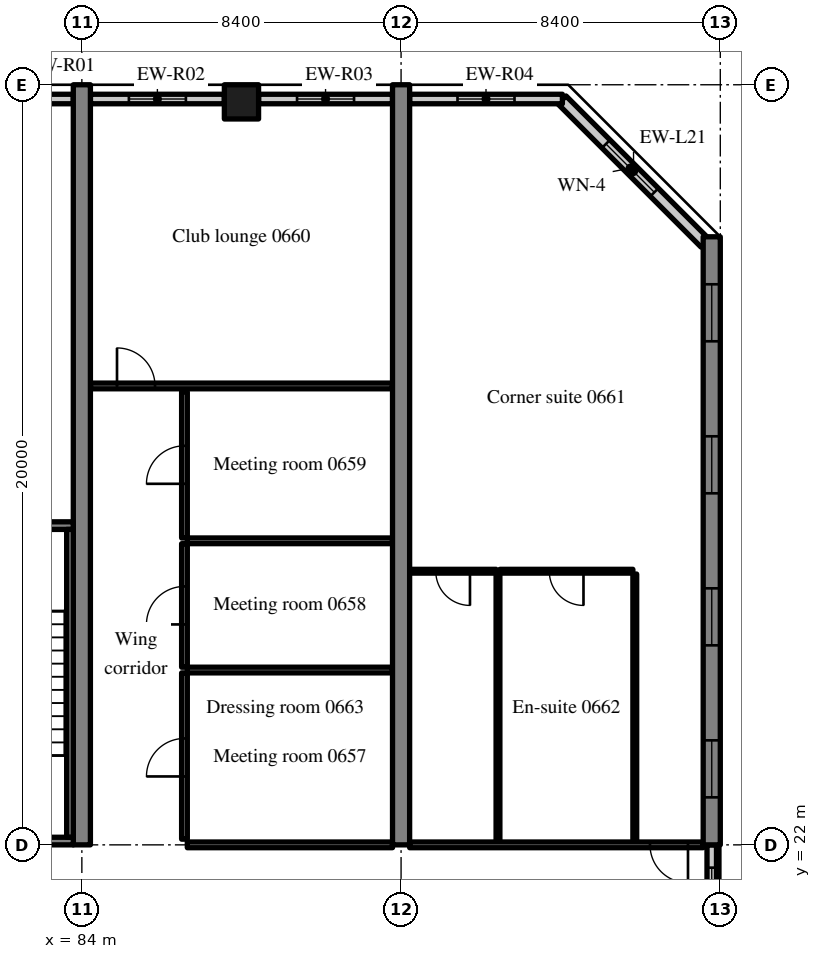
"""IFC4 building model, lengths in metres.
Left out: names, types, materials, properties, quantities, classifications, styles, units other than length and angle.
Written with IfcOpenShell. Run it as: python <this file> out.ifc"""

import sys

from ifc_helpers import new_model, si_unit, direction, frame, frame_2d, origin, origin_2d, place, context, subcontext, project, spatial, rectangle, extrude, source, transform, mapped, element, fill, save


model = new_model("IFC4")
c1 = context("Model", 3, precision=1e-05, world=origin(), true_north=direction((0.0, 1.0)))
c2 = subcontext(c1, "Body", "Model", "MODEL_VIEW")
j1 = project(units=[si_unit("LENGTHUNIT", "METRE"), si_unit("PLANEANGLEUNIT", "RADIAN")], contexts=[c1])
p1 = place(None, origin())
s1 = spatial("IfcSite", under=j1, at=p1, CompositionType="ELEMENT")
p2 = place(p1, origin())
s2 = spatial("IfcBuilding", under=s1, at=p2, CompositionType="ELEMENT")
p3 = place(p2, frame((0.0, 0.0, 31.6)))
s3 = spatial("IfcBuildingStorey", under=s2, at=p3, CompositionType="ELEMENT", Elevation=31.6)
m1 = source(origin(), c2, "Body", "SweptSolid", [
    extrude(rectangle(XDim=20.0, YDim=0.45, at=frame_2d((10.0, 0.0))), origin(), (0.0, 0.0, 1.0), 3.52),
])
for number, where, z_axis, x_axis in (
    (1, (84.0, 22.0, 0.0), (0.0, 0.0, 1.0), (0.0, 1.0, 0.0)),
    (2, (92.4, 22.0, 0.0), (0.0, 0.0, 1.0), (0.0, 1.0, 0.0)),
):
    element("IfcWall", number, at=place(p3, frame(where, z_axis=z_axis, x_axis=x_axis)), inside=s3, PredefinedType="SHEAR", context=c2, shape_type="MappedRepresentation", body=[
        mapped(m1, transform((0.0, 0.0, 0.0), scale=1.0)),
    ])
m2 = source(origin(), c2, "Body", "SweptSolid", [
    extrude(rectangle(XDim=16.0, YDim=0.45, at=frame_2d((8.0, 0.0))), origin(), (0.0, 0.0, 1.0), 3.52),
])
p4 = place(p3, frame((100.575, 22.0, 0.0), z_axis=(0.0, 0.0, 1.0), x_axis=(0.0, 1.0, 0.0)))
e3 = element("IfcWall", 3, at=p4, inside=s3, PredefinedType="SHEAR", context=c2, shape_type="MappedRepresentation", body=[
    mapped(m2, transform((0.0, 0.0, 0.0), scale=1.0)),
])
m3 = source(origin(), c2, "Body", "SweptSolid", [
    extrude(rectangle(XDim=1.5, YDim=1.5, at=frame_2d((0.75, 0.75))), frame((0.0, 0.235, 0.0), z_axis=(0.0, -1.0, 0.0), x_axis=(1.0, 0.0, 0.0)), (0.0, 0.0, 1.0), 0.47),
])
p5 = place(p4, frame((1.25, 0.0, 0.9)))
e4 = element("IfcOpeningElement", 4, at=p5, cuts=e3, PredefinedType="OPENING", context=c2, shape_type="MappedRepresentation", body=[
    mapped(m3, transform((0.0, 0.0, 0.0), scale=1.0)),
])
p6 = place(p4, frame((5.25, 0.0, 0.9)))
e5 = element("IfcOpeningElement", 5, at=p6, cuts=e3, PredefinedType="OPENING", context=c2, shape_type="MappedRepresentation", body=[
    mapped(m3, transform((0.0, 0.0, 0.0), scale=1.0)),
])
p7 = place(p4, frame((9.25, 0.0, 0.9)))
e6 = element("IfcOpeningElement", 6, at=p7, cuts=e3, PredefinedType="OPENING", context=c2, shape_type="MappedRepresentation", body=[
    mapped(m3, transform((0.0, 0.0, 0.0), scale=1.0)),
])
p8 = place(p4, frame((13.25, 0.0, 0.9)))
e7 = element("IfcOpeningElement", 7, at=p8, cuts=e3, PredefinedType="OPENING", context=c2, shape_type="MappedRepresentation", body=[
    mapped(m3, transform((0.0, 0.0, 0.0), scale=1.0)),
])
m4 = source(origin(), c2, "Body", "SweptSolid", [
    extrude(rectangle(XDim=0.9, YDim=0.9, at=origin_2d()), origin(), (0.0, 0.0, 1.0), 3.52),
])
p9 = place(p3, frame((88.2, 41.55, 0.0), z_axis=(0.0, 0.0, 1.0), x_axis=(1.0, 0.0, 0.0)))
e8 = element("IfcColumn", 8, at=p9, inside=s3, PredefinedType="COLUMN", context=c2, shape_type="MappedRepresentation", body=[
    mapped(m4, transform((0.0, 0.0, 0.0), scale=1.0)),
])
m5 = source(origin(), c2, "Body", "SweptSolid", [
    extrude(rectangle(XDim=5.326, YDim=0.3, at=frame_2d((2.663, 0.0))), origin(), (0.0, 0.0, 1.0), 3.52),
])
p10 = place(p3, frame((100.4, 37.834, 0.0), z_axis=(0.0, 0.0, 1.0), x_axis=(-0.707083859269, 0.707129702361, 0.0)))
e9 = element("IfcWall", 9, at=p10, inside=s3, PredefinedType="SOLIDWALL", context=c2, shape_type="MappedRepresentation", body=[
    mapped(m5, transform((0.0, 0.0, 0.0), scale=1.0)),
])
m6 = source(origin(), c2, "Body", "SweptSolid", [
    extrude(rectangle(XDim=1.8, YDim=1.5, at=frame_2d((0.9, 0.75))), frame((0.0, 0.16, 0.0), z_axis=(0.0, -1.0, 0.0), x_axis=(1.0, 0.0, 0.0)), (0.0, 0.0, 1.0), 0.32),
])
p11 = place(p10, frame((1.889, 0.0, 0.9)))
e10 = element("IfcOpeningElement", 10, at=p11, cuts=e9, PredefinedType="OPENING", context=c2, shape_type="MappedRepresentation", body=[
    mapped(m6, transform((0.0, 0.0, 0.0), scale=1.0)),
])
m7 = source(origin(), c2, "Body", "SweptSolid", [
    extrude(rectangle(XDim=1.633, YDim=0.25, at=frame_2d((0.816, 0.0))), origin(), (0.0, 0.0, 1.0), 2.77),
])
p12 = place(p3, frame((83.775, 41.625, 0.0), z_axis=(0.0, 0.0, 1.0), x_axis=(-1.0, 0.0, 0.0)))
e11 = element("IfcWall", 11, at=p12, inside=s3, PredefinedType="SOLIDWALL", context=c2, shape_type="MappedRepresentation", body=[
    mapped(m7, transform((0.0, 0.0, 0.0), scale=1.0)),
])
m8 = source(origin(), c2, "Body", "SweptSolid", [
    extrude(rectangle(XDim=3.525, YDim=0.25, at=frame_2d((1.762, 0.0))), origin(), (0.0, 0.0, 1.0), 2.77),
])
p13 = place(p3, frame((87.75, 41.625, 0.0), z_axis=(0.0, 0.0, 1.0), x_axis=(-1.0, 0.0, 0.0)))
e12 = element("IfcWall", 12, at=p13, inside=s3, PredefinedType="SOLIDWALL", context=c2, shape_type="MappedRepresentation", body=[
    mapped(m8, transform((0.0, 0.0, 0.0), scale=1.0)),
])
m9 = source(origin(), c2, "Body", "SweptSolid", [
    extrude(rectangle(XDim=1.5, YDim=1.5, at=frame_2d((0.75, 0.75))), frame((0.0, 0.135, 0.0), z_axis=(0.0, -1.0, 0.0), x_axis=(1.0, 0.0, 0.0)), (0.0, 0.0, 1.0), 0.27),
])
p14 = place(p13, frame((1.012, 0.0, 0.9)))
e13 = element("IfcOpeningElement", 13, at=p14, cuts=e12, PredefinedType="OPENING", context=c2, shape_type="MappedRepresentation", body=[
    mapped(m9, transform((0.0, 0.0, 0.0), scale=1.0)),
])
m10 = source(origin(), c2, "Body", "SweptSolid", [
    extrude(rectangle(XDim=3.525, YDim=0.25, at=frame_2d((1.763, 0.0))), origin(), (0.0, 0.0, 1.0), 2.77),
])
p15 = place(p3, frame((92.175, 41.625, 0.0), z_axis=(0.0, 0.0, 1.0), x_axis=(-1.0, 0.0, 0.0)))
e14 = element("IfcWall", 14, at=p15, inside=s3, PredefinedType="SOLIDWALL", context=c2, shape_type="MappedRepresentation", body=[
    mapped(m10, transform((0.0, 0.0, 0.0), scale=1.0)),
])
p16 = place(p15, frame((1.012, 0.0, 0.9)))
e15 = element("IfcOpeningElement", 15, at=p16, cuts=e14, PredefinedType="OPENING", context=c2, shape_type="MappedRepresentation", body=[
    mapped(m9, transform((0.0, 0.0, 0.0), scale=1.0)),
])
m11 = source(origin(), c2, "Body", "SweptSolid", [
    extrude(rectangle(XDim=4.02, YDim=0.25, at=frame_2d((2.01, 0.0))), origin(), (0.0, 0.0, 1.0), 2.77),
])
p17 = place(p3, frame((96.645, 41.625, 0.0), z_axis=(0.0, 0.0, 1.0), x_axis=(-1.0, 0.0, 0.0)))
e16 = element("IfcWall", 16, at=p17, inside=s3, PredefinedType="SOLIDWALL", context=c2, shape_type="MappedRepresentation", body=[
    mapped(m11, transform((0.0, 0.0, 0.0), scale=1.0)),
])
p18 = place(p17, frame((1.26, 0.0, 0.9)))
e17 = element("IfcOpeningElement", 17, at=p18, cuts=e16, PredefinedType="OPENING", context=c2, shape_type="MappedRepresentation", body=[
    mapped(m9, transform((0.0, 0.0, 0.0), scale=1.0)),
])
m12 = source(origin(), c2, "Body", "SweptSolid", [
    extrude(rectangle(XDim=2.4, YDim=0.25, at=frame_2d((1.2, 0.0))), origin(), (0.0, 0.0, 1.0), 2.62),
])
p19 = place(p3, frame((100.575, 19.6, 0.0), z_axis=(0.0, 0.0, 1.0), x_axis=(0.0, 1.0, 0.0)))
e18 = element("IfcWall", 18, at=p19, inside=s3, PredefinedType="SOLIDWALL", context=c2, shape_type="MappedRepresentation", body=[
    mapped(m12, transform((0.0, 0.0, 0.0), scale=1.0)),
])
m13 = source(origin(), c2, "Body", "SweptSolid", [
    extrude(rectangle(XDim=1.2, YDim=1.5, at=frame_2d((0.6, 0.75))), frame((0.0, 0.135, 0.0), z_axis=(0.0, -1.0, 0.0), x_axis=(1.0, 0.0, 0.0)), (0.0, 0.0, 1.0), 0.27),
])
p20 = place(p19, frame((0.6, 0.0, 0.9)))
e19 = element("IfcOpeningElement", 19, at=p20, cuts=e18, PredefinedType="OPENING", context=c2, shape_type="MappedRepresentation", body=[
    mapped(m13, transform((0.0, 0.0, 0.0), scale=1.0)),
])
m14 = source(origin(), c2, "Body", "SweptSolid", [
    extrude(rectangle(XDim=8.175, YDim=0.2, at=frame_2d((4.087, 0.0))), origin(), (0.0, 0.0, 1.0), 3.52),
])
p21 = place(p3, frame((83.775, 22.1, 0.0), z_axis=(0.0, 0.0, 1.0), x_axis=(-1.0, 0.0, 0.0)))
e20 = element("IfcWall", 20, at=p21, inside=s3, PredefinedType="SOLIDWALL", context=c2, shape_type="MappedRepresentation", body=[
    mapped(m14, transform((0.0, 0.0, 0.0), scale=1.0)),
])
m15 = source(origin(), c2, "Body", "SweptSolid", [
    extrude(rectangle(XDim=1.2, YDim=2.1, at=frame_2d((0.6, 1.05))), frame((0.0, 0.11, 0.0), z_axis=(0.0, -1.0, 0.0), x_axis=(1.0, 0.0, 0.0)), (0.0, 0.0, 1.0), 0.22),
])
p22 = place(p21, frame((5.975, 0.0, 0.0)))
e21 = element("IfcOpeningElement", 21, at=p22, cuts=e20, PredefinedType="OPENING", context=c2, shape_type="MappedRepresentation", body=[
    mapped(m15, transform((0.0, 0.0, 0.0), scale=1.0)),
])
p23 = place(p3, frame((83.775, 30.4, 0.0), z_axis=(0.0, 0.0, 1.0), x_axis=(-1.0, 0.0, 0.0)))
e22 = element("IfcWall", 22, at=p23, inside=s3, PredefinedType="SOLIDWALL", context=c2, shape_type="MappedRepresentation", body=[
    mapped(m14, transform((0.0, 0.0, 0.0), scale=1.0)),
])
m16 = source(origin(), c2, "Body", "SweptSolid", [
    extrude(rectangle(XDim=1.0, YDim=2.1, at=frame_2d((0.5, 1.05))), frame((0.0, 0.11, 0.0), z_axis=(0.0, -1.0, 0.0), x_axis=(1.0, 0.0, 0.0)), (0.0, 0.0, 1.0), 0.22),
])
p24 = place(p23, frame((6.075, 0.0, 0.0)))
e23 = element("IfcOpeningElement", 23, at=p24, cuts=e22, PredefinedType="OPENING", context=c2, shape_type="MappedRepresentation", body=[
    mapped(m16, transform((0.0, 0.0, 0.0), scale=1.0)),
])
m17 = source(origin(), c2, "Body", "SweptSolid", [
    extrude(rectangle(XDim=8.1, YDim=0.175, at=frame_2d((4.05, 0.0))), origin(), (0.0, 0.0, 1.0), 3.52),
])
p25 = place(p3, frame((83.688, 22.2, 0.0), z_axis=(0.0, 0.0, 1.0), x_axis=(0.0, 1.0, 0.0)))
e24 = element("IfcWall", 24, at=p25, inside=s3, PredefinedType="SOLIDWALL", context=c2, shape_type="MappedRepresentation", body=[
    mapped(m17, transform((0.0, 0.0, 0.0), scale=1.0)),
])
m18 = source(origin(), c2, "Body", "SweptSolid", [
    extrude(rectangle(XDim=5.4, YDim=0.15, at=frame_2d((2.7, 0.0))), origin(), (0.0, 0.0, 1.0), 2.82),
])
p26 = place(p3, frame((86.775, 22.0, 0.0), z_axis=(0.0, 0.0, 1.0), x_axis=(1.0, 0.0, 0.0)))
e25 = element("IfcWall", 25, at=p26, inside=s3, PredefinedType="PARTITIONING", context=c2, shape_type="MappedRepresentation", body=[
    mapped(m18, transform((0.0, 0.0, 0.0), scale=1.0)),
])
m19 = source(origin(), c2, "Body", "SweptSolid", [
    extrude(rectangle(XDim=4.375, YDim=0.15, at=frame_2d((2.188, 0.0))), origin(), (0.0, 0.0, 1.0), 3.52),
])
p27 = place(p3, frame((86.7, 22.15, 0.0), z_axis=(0.0, 0.0, 1.0), x_axis=(0.0, 1.0, 0.0)))
e26 = element("IfcWall", 26, at=p27, inside=s3, PredefinedType="PARTITIONING", context=c2, shape_type="MappedRepresentation", body=[
    mapped(m19, transform((0.0, 0.0, 0.0), scale=1.0)),
])
m20 = source(origin(), c2, "Body", "SweptSolid", [
    extrude(rectangle(XDim=1.0, YDim=2.1, at=frame_2d((0.5, 1.05))), frame((0.0, 0.085, 0.0), z_axis=(0.0, -1.0, 0.0), x_axis=(1.0, 0.0, 0.0)), (0.0, 0.0, 1.0), 0.17),
])
p28 = place(p27, frame((1.65, 0.0, 0.0)))
e27 = element("IfcOpeningElement", 27, at=p28, cuts=e26, PredefinedType="OPENING", context=c2, shape_type="MappedRepresentation", body=[
    mapped(m20, transform((0.0, 0.0, 0.0), scale=1.0)),
])
m21 = source(origin(), c2, "Body", "SweptSolid", [
    extrude(rectangle(XDim=5.4, YDim=0.15, at=frame_2d((2.7, 0.0))), origin(), (0.0, 0.0, 1.0), 3.52),
])
p29 = place(p3, frame((86.775, 26.6, 0.0), z_axis=(0.0, 0.0, 1.0), x_axis=(1.0, 0.0, 0.0)))
e28 = element("IfcWall", 28, at=p29, inside=s3, PredefinedType="PARTITIONING", context=c2, shape_type="MappedRepresentation", body=[
    mapped(m21, transform((0.0, 0.0, 0.0), scale=1.0)),
])
m22 = source(origin(), c2, "Body", "SweptSolid", [
    extrude(rectangle(XDim=3.25, YDim=0.15, at=frame_2d((1.625, 0.0))), origin(), (0.0, 0.0, 1.0), 3.52),
])
p30 = place(p3, frame((86.7, 26.675, 0.0), z_axis=(0.0, 0.0, 1.0), x_axis=(0.0, 1.0, 0.0)))
e29 = element("IfcWall", 29, at=p30, inside=s3, PredefinedType="PARTITIONING", context=c2, shape_type="MappedRepresentation", body=[
    mapped(m22, transform((0.0, 0.0, 0.0), scale=1.0)),
])
p31 = place(p30, frame((1.125, 0.0, 0.0)))
e30 = element("IfcOpeningElement", 30, at=p31, cuts=e29, PredefinedType="OPENING", context=c2, shape_type="MappedRepresentation", body=[
    mapped(m20, transform((0.0, 0.0, 0.0), scale=1.0)),
])
p32 = place(p3, frame((86.775, 30.0, 0.0), z_axis=(0.0, 0.0, 1.0), x_axis=(1.0, 0.0, 0.0)))
e31 = element("IfcWall", 31, at=p32, inside=s3, PredefinedType="PARTITIONING", context=c2, shape_type="MappedRepresentation", body=[
    mapped(m21, transform((0.0, 0.0, 0.0), scale=1.0)),
])
m23 = source(origin(), c2, "Body", "SweptSolid", [
    extrude(rectangle(XDim=3.85, YDim=0.15, at=frame_2d((1.925, 0.0))), origin(), (0.0, 0.0, 1.0), 3.52),
])
p33 = place(p3, frame((86.7, 30.075, 0.0), z_axis=(0.0, 0.0, 1.0), x_axis=(0.0, 1.0, 0.0)))
e32 = element("IfcWall", 32, at=p33, inside=s3, PredefinedType="PARTITIONING", context=c2, shape_type="MappedRepresentation", body=[
    mapped(m23, transform((0.0, 0.0, 0.0), scale=1.0)),
])
p34 = place(p33, frame((1.425, 0.0, 0.0)))
e33 = element("IfcOpeningElement", 33, at=p34, cuts=e32, PredefinedType="OPENING", context=c2, shape_type="MappedRepresentation", body=[
    mapped(m20, transform((0.0, 0.0, 0.0), scale=1.0)),
])
m24 = source(origin(), c2, "Body", "SweptSolid", [
    extrude(rectangle(XDim=7.95, YDim=0.15, at=frame_2d((3.975, 0.0))), origin(), (0.0, 0.0, 1.0), 3.52),
])
p35 = place(p3, frame((84.225, 34.075, 0.0), z_axis=(0.0, 0.0, 1.0), x_axis=(1.0, 0.0, 0.0)))
e34 = element("IfcWall", 34, at=p35, inside=s3, PredefinedType="PARTITIONING", context=c2, shape_type="MappedRepresentation", body=[
    mapped(m24, transform((0.0, 0.0, 0.0), scale=1.0)),
])
p36 = place(p35, frame((0.7, 0.0, 0.0)))
e35 = element("IfcOpeningElement", 35, at=p36, cuts=e34, PredefinedType="OPENING", context=c2, shape_type="MappedRepresentation", body=[
    mapped(m20, transform((0.0, 0.0, 0.0), scale=1.0)),
])
m25 = source(origin(), c2, "Body", "SweptSolid", [
    extrude(rectangle(XDim=7.05, YDim=0.1, at=frame_2d((3.525, 0.0))), origin(), (0.0, 0.0, 1.0), 3.52),
])
for number, where, z_axis, x_axis in (
    (36, (98.55, 22.075, 0.0), (0.0, 0.0, 1.0), (0.0, 1.0, 0.0)),
    (37, (94.95, 22.075, 0.0), (0.0, 0.0, 1.0), (0.0, 1.0, 0.0)),
):
    element("IfcWall", number, at=place(p3, frame(where, z_axis=z_axis, x_axis=x_axis)), inside=s3, PredefinedType="PARTITIONING", context=c2, shape_type="MappedRepresentation", body=[
        mapped(m25, transform((0.0, 0.0, 0.0), scale=1.0)),
    ])
m26 = source(origin(), c2, "Body", "SweptSolid", [
    extrude(rectangle(XDim=3.5, YDim=0.1, at=frame_2d((1.75, 0.0))), origin(), (0.0, 0.0, 1.0), 3.52),
])
p37 = place(p3, frame((95.0, 29.2, 0.0), z_axis=(0.0, 0.0, 1.0), x_axis=(1.0, 0.0, 0.0)))
e38 = element("IfcWall", 38, at=p37, inside=s3, PredefinedType="PARTITIONING", context=c2, shape_type="MappedRepresentation", body=[
    mapped(m26, transform((0.0, 0.0, 0.0), scale=1.0)),
])
m27 = source(origin(), c2, "Body", "SweptSolid", [
    extrude(rectangle(XDim=0.9, YDim=2.1, at=frame_2d((0.45, 1.05))), frame((0.0, 0.06, 0.0), z_axis=(0.0, -1.0, 0.0), x_axis=(1.0, 0.0, 0.0)), (0.0, 0.0, 1.0), 0.12),
])
p38 = place(p37, frame((1.3, 0.0, 0.0)))
e39 = element("IfcOpeningElement", 39, at=p38, cuts=e38, PredefinedType="OPENING", context=c2, shape_type="MappedRepresentation", body=[
    mapped(m27, transform((0.0, 0.0, 0.0), scale=1.0)),
])
m28 = source(origin(), c2, "Body", "SweptSolid", [
    extrude(rectangle(XDim=2.275, YDim=0.1, at=frame_2d((1.137, 0.0))), origin(), (0.0, 0.0, 1.0), 3.52),
])
p39 = place(p3, frame((92.625, 29.2, 0.0), z_axis=(0.0, 0.0, 1.0), x_axis=(1.0, 0.0, 0.0)))
e40 = element("IfcWall", 40, at=p39, inside=s3, PredefinedType="PARTITIONING", context=c2, shape_type="MappedRepresentation", body=[
    mapped(m28, transform((0.0, 0.0, 0.0), scale=1.0)),
])
p40 = place(p39, frame((0.688, 0.0, 0.0)))
e41 = element("IfcOpeningElement", 41, at=p40, cuts=e40, PredefinedType="OPENING", context=c2, shape_type="MappedRepresentation", body=[
    mapped(m27, transform((0.0, 0.0, 0.0), scale=1.0)),
])
m29 = source(origin(), c2, "Body", "SweptSolid", [
    extrude(rectangle(XDim=7.725, YDim=0.15, at=frame_2d((3.863, 0.0))), origin(), (0.0, 0.0, 1.0), 2.82),
])
p41 = place(p3, frame((92.625, 22.0, 0.0), z_axis=(0.0, 0.0, 1.0), x_axis=(1.0, 0.0, 0.0)))
e42 = element("IfcWall", 42, at=p41, inside=s3, PredefinedType="PARTITIONING", context=c2, shape_type="MappedRepresentation", body=[
    mapped(m29, transform((0.0, 0.0, 0.0), scale=1.0)),
])
p42 = place(p41, frame((6.325, 0.0, 0.0)))
e43 = element("IfcOpeningElement", 43, at=p42, cuts=e42, PredefinedType="OPENING", context=c2, shape_type="MappedRepresentation", body=[
    mapped(m20, transform((0.0, 0.0, 0.0), scale=1.0)),
])
m30 = source(origin(), c2, "Body", "SweptSolid", [
    extrude(rectangle(XDim=1.8, YDim=1.5, at=frame_2d((0.9, 0.75))), frame((0.0, 0.03, 0.0), z_axis=(0.0, -1.0, 0.0), x_axis=(1.0, 0.0, 0.0)), (0.0, 0.0, 1.0), 0.06),
])
p43 = place(p11, origin())
e44 = element("IfcWindow", 44, at=p43, inside=s3, PartitioningType="SINGLE_PANEL", PredefinedType="WINDOW", context=c2, shape_type="MappedRepresentation", body=[
    mapped(m30, transform((0.0, 0.0, 0.0), scale=1.0)),
])
fill(e10, e44)
m31 = source(origin(), c2, "Body", "SweptSolid", [
    extrude(rectangle(XDim=1.5, YDim=1.5, at=frame_2d((0.75, 0.75))), frame((0.0, 0.03, 0.0), z_axis=(0.0, -1.0, 0.0), x_axis=(1.0, 0.0, 0.0)), (0.0, 0.0, 1.0), 0.06),
])
p44 = place(p14, origin())
e45 = element("IfcWindow", 45, at=p44, inside=s3, PartitioningType="SINGLE_PANEL", PredefinedType="WINDOW", context=c2, shape_type="MappedRepresentation", body=[
    mapped(m31, transform((0.0, 0.0, 0.0), scale=1.0)),
])
fill(e13, e45)
p45 = place(p16, origin())
e46 = element("IfcWindow", 46, at=p45, inside=s3, PartitioningType="SINGLE_PANEL", PredefinedType="WINDOW", context=c2, shape_type="MappedRepresentation", body=[
    mapped(m31, transform((0.0, 0.0, 0.0), scale=1.0)),
])
fill(e15, e46)
p46 = place(p18, origin())
e47 = element("IfcWindow", 47, at=p46, inside=s3, PartitioningType="SINGLE_PANEL", PredefinedType="WINDOW", context=c2, shape_type="MappedRepresentation", body=[
    mapped(m31, transform((0.0, 0.0, 0.0), scale=1.0)),
])
fill(e17, e47)
p47 = place(p5, origin())
e48 = element("IfcWindow", 48, at=p47, inside=s3, PartitioningType="SINGLE_PANEL", PredefinedType="WINDOW", context=c2, shape_type="MappedRepresentation", body=[
    mapped(m31, transform((0.0, 0.0, 0.0), scale=1.0)),
])
fill(e4, e48)
p48 = place(p6, origin())
e49 = element("IfcWindow", 49, at=p48, inside=s3, PartitioningType="SINGLE_PANEL", PredefinedType="WINDOW", context=c2, shape_type="MappedRepresentation", body=[
    mapped(m31, transform((0.0, 0.0, 0.0), scale=1.0)),
])
fill(e5, e49)
p49 = place(p7, origin())
e50 = element("IfcWindow", 50, at=p49, inside=s3, PartitioningType="SINGLE_PANEL", PredefinedType="WINDOW", context=c2, shape_type="MappedRepresentation", body=[
    mapped(m31, transform((0.0, 0.0, 0.0), scale=1.0)),
])
fill(e6, e50)
p50 = place(p8, origin())
e51 = element("IfcWindow", 51, at=p50, inside=s3, PartitioningType="SINGLE_PANEL", PredefinedType="WINDOW", context=c2, shape_type="MappedRepresentation", body=[
    mapped(m31, transform((0.0, 0.0, 0.0), scale=1.0)),
])
fill(e7, e51)
m32 = source(origin(), c2, "Body", "SweptSolid", [
    extrude(rectangle(XDim=1.2, YDim=1.5, at=frame_2d((0.6, 0.75))), frame((0.0, 0.03, 0.0), z_axis=(0.0, -1.0, 0.0), x_axis=(1.0, 0.0, 0.0)), (0.0, 0.0, 1.0), 0.06),
])
p51 = place(p20, origin())
e52 = element("IfcWindow", 52, at=p51, inside=s3, PartitioningType="SINGLE_PANEL", PredefinedType="WINDOW", context=c2, shape_type="MappedRepresentation", body=[
    mapped(m32, transform((0.0, 0.0, 0.0), scale=1.0)),
])
fill(e19, e52)
m33 = source(origin(), c2, "Body", "SweptSolid", [
    extrude(rectangle(XDim=1.0, YDim=2.1, at=frame_2d((0.5, 1.05))), frame((0.0, 0.025, 0.0), z_axis=(0.0, -1.0, 0.0), x_axis=(1.0, 0.0, 0.0)), (0.0, 0.0, 1.0), 0.05),
])
p52 = place(p28, origin())
e53 = element("IfcDoor", 53, at=p52, inside=s3, OperationType="SINGLE_SWING_LEFT", PredefinedType="DOOR", context=c2, shape_type="MappedRepresentation", body=[
    mapped(m33, transform((0.0, 0.0, 0.0), scale=1.0)),
])
fill(e27, e53)
p53 = place(p31, origin())
e54 = element("IfcDoor", 54, at=p53, inside=s3, OperationType="SINGLE_SWING_LEFT", PredefinedType="DOOR", context=c2, shape_type="MappedRepresentation", body=[
    mapped(m33, transform((0.0, 0.0, 0.0), scale=1.0)),
])
fill(e30, e54)
p54 = place(p34, origin())
e55 = element("IfcDoor", 55, at=p54, inside=s3, OperationType="SINGLE_SWING_LEFT", PredefinedType="DOOR", context=c2, shape_type="MappedRepresentation", body=[
    mapped(m33, transform((0.0, 0.0, 0.0), scale=1.0)),
])
fill(e33, e55)
p55 = place(p36, origin())
e56 = element("IfcDoor", 56, at=p55, inside=s3, OperationType="SINGLE_SWING_LEFT", PredefinedType="DOOR", context=c2, shape_type="MappedRepresentation", body=[
    mapped(m33, transform((0.0, 0.0, 0.0), scale=1.0)),
])
fill(e35, e56)
m34 = source(origin(), c2, "Body", "SweptSolid", [
    extrude(rectangle(XDim=0.9, YDim=2.1, at=frame_2d((0.45, 1.05))), frame((0.0, 0.025, 0.0), z_axis=(0.0, -1.0, 0.0), x_axis=(1.0, 0.0, 0.0)), (0.0, 0.0, 1.0), 0.05),
])
p56 = place(p38, origin())
e57 = element("IfcDoor", 57, at=p56, inside=s3, OperationType="SINGLE_SWING_RIGHT", PredefinedType="DOOR", context=c2, shape_type="MappedRepresentation", body=[
    mapped(m34, transform((0.0, 0.0, 0.0), scale=1.0)),
])
fill(e39, e57)
p57 = place(p40, origin())
e58 = element("IfcDoor", 58, at=p57, inside=s3, OperationType="SINGLE_SWING_RIGHT", PredefinedType="DOOR", context=c2, shape_type="MappedRepresentation", body=[
    mapped(m34, transform((0.0, 0.0, 0.0), scale=1.0)),
])
fill(e41, e58)
p58 = place(p42, origin())
e59 = element("IfcDoor", 59, at=p58, inside=s3, OperationType="SINGLE_SWING_RIGHT", PredefinedType="DOOR", context=c2, shape_type="MappedRepresentation", body=[
    mapped(m33, transform((0.0, 0.0, 0.0), scale=1.0)),
])
fill(e43, e59)
save(model, sys.argv[1])
